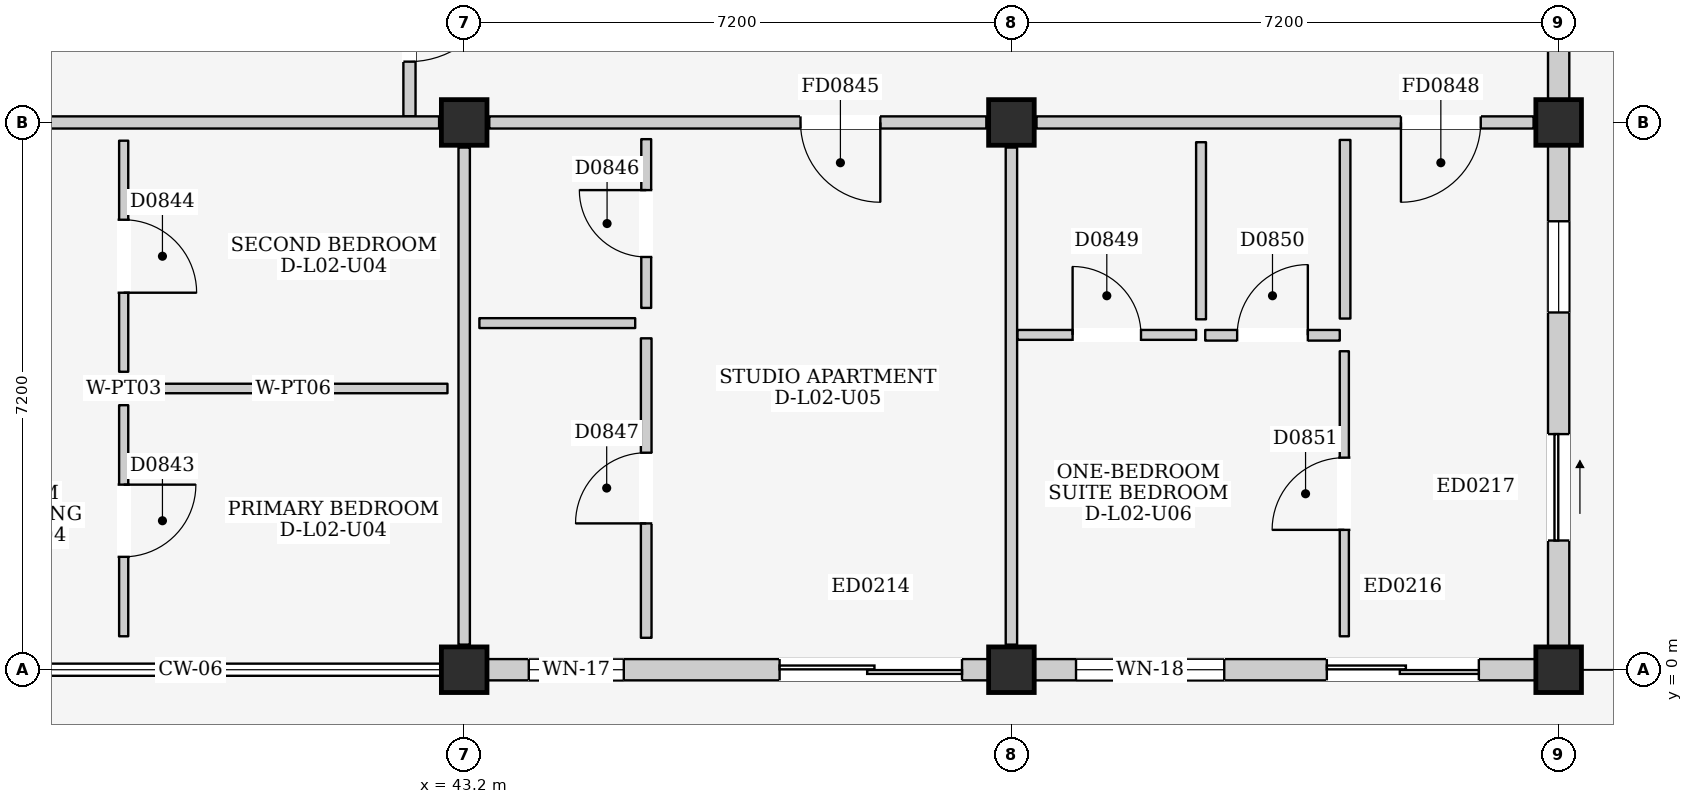
"""IFC4 building model, lengths in metres.
Left out: names, types, materials, properties, quantities, classifications, styles, units other than length and angle.
Written with IfcOpenShell. Run it as: python <this file> out.ifc"""

import sys

from ifc_helpers import new_model, si_unit, direction, frame, frame_2d, origin, origin_2d, place, context, subcontext, project, spatial, rectangle, extrude, element, fill, save


model = new_model("IFC4")
c1 = context("Model", 3, precision=1e-05, world=origin(), true_north=direction((0.0, 1.0)))
c2 = subcontext(c1, "Body", "Model", "MODEL_VIEW")
j1 = project(units=[si_unit("LENGTHUNIT", "METRE"), si_unit("PLANEANGLEUNIT", "RADIAN")], contexts=[c1])
p1 = place(None, origin())
s1 = spatial("IfcSite", under=j1, at=p1, CompositionType="ELEMENT")
p2 = place(p1, origin())
s2 = spatial("IfcBuilding", under=s1, at=p2, CompositionType="ELEMENT")
p3 = place(p2, frame((0.0, 0.0, 9.0)))
s3 = spatial("IfcBuildingStorey", under=s2, at=p3, CompositionType="ELEMENT", Elevation=9.0)
for number, where, z_axis, x_axis in (
    (1, (43.2, 0.0, 0.0), (0.0, 0.0, 1.0), (1.0, 0.0, 0.0)),
    (2, (43.2, 7.2, 0.0), (0.0, 0.0, 1.0), (1.0, 0.0, 0.0)),
    (3, (50.4, 0.0, 0.0), (0.0, 0.0, 1.0), (1.0, 0.0, 0.0)),
    (4, (50.4, 7.2, 0.0), (0.0, 0.0, 1.0), (1.0, 0.0, 0.0)),
    (5, (57.6, 0.0, 0.0), (0.0, 0.0, 1.0), (1.0, 0.0, 0.0)),
    (6, (57.6, 7.2, 0.0), (0.0, 0.0, 1.0), (1.0, 0.0, 0.0)),
):
    element("IfcColumn", number, at=place(p3, frame(where, z_axis=z_axis, x_axis=x_axis)), inside=s3, PredefinedType="COLUMN", context=c2, shape_type="SweptSolid", body=[
        extrude(rectangle(XDim=0.6, YDim=0.6, at=origin_2d()), origin(), (0.0, 0.0, 1.0), 3.2),
    ])
p4 = place(p3, frame((43.5, 0.0, 0.0), z_axis=(0.0, 0.0, 1.0), x_axis=(1.0, 0.0, 0.0)))
e7 = element("IfcWall", 7, at=p4, inside=s3, PredefinedType="ELEMENTEDWALL", context=c2, shape_type="SweptSolid", body=[
    extrude(rectangle(XDim=6.6, YDim=0.28, at=frame_2d((3.3, 0.0))), origin(), (0.0, 0.0, 1.0), 2.425),
])
p5 = place(p4, frame((3.85, 0.0, 0.0)))
e8 = element("IfcOpeningElement", 8, at=p5, cuts=e7, PredefinedType="OPENING", context=c2, shape_type="SweptSolid", body=[
    extrude(rectangle(XDim=2.4, YDim=2.12, at=frame_2d((1.2, 1.06))), frame((0.0, 0.155, 0.0), z_axis=(0.0, -1.0, 0.0), x_axis=(1.0, 0.0, 0.0)), (0.0, 0.0, 1.0), 0.31),
])
p6 = place(p4, frame((0.55, 0.0, 0.9)))
e9 = element("IfcOpeningElement", 9, at=p6, cuts=e7, PredefinedType="OPENING", context=c2, shape_type="SweptSolid", body=[
    extrude(rectangle(XDim=1.25, YDim=1.3, at=frame_2d((0.625, 0.65))), frame((0.0, 0.155, 0.0), z_axis=(0.0, -1.0, 0.0), x_axis=(1.0, 0.0, 0.0)), (0.0, 0.0, 1.0), 0.31),
])
p7 = place(p3, frame((50.7, 0.0, 0.0), z_axis=(0.0, 0.0, 1.0), x_axis=(1.0, 0.0, 0.0)))
e10 = element("IfcWall", 10, at=p7, inside=s3, PredefinedType="ELEMENTEDWALL", context=c2, shape_type="SweptSolid", body=[
    extrude(rectangle(XDim=6.6, YDim=0.28, at=frame_2d((3.3, 0.0))), origin(), (0.0, 0.0, 1.0), 2.425),
])
p8 = place(p7, frame((3.85, 0.0, 0.0)))
e11 = element("IfcOpeningElement", 11, at=p8, cuts=e10, PredefinedType="OPENING", context=c2, shape_type="SweptSolid", body=[
    extrude(rectangle(XDim=2.0, YDim=2.12, at=frame_2d((1.0, 1.06))), frame((0.0, 0.155, 0.0), z_axis=(0.0, -1.0, 0.0), x_axis=(1.0, 0.0, 0.0)), (0.0, 0.0, 1.0), 0.31),
])
p9 = place(p7, frame((0.55, 0.0, 0.765)))
e12 = element("IfcOpeningElement", 12, at=p9, cuts=e10, PredefinedType="OPENING", context=c2, shape_type="SweptSolid", body=[
    extrude(rectangle(XDim=1.95, YDim=1.55, at=frame_2d((0.975, 0.775))), frame((0.0, 0.155, 0.0), z_axis=(0.0, -1.0, 0.0), x_axis=(1.0, 0.0, 0.0)), (0.0, 0.0, 1.0), 0.31),
])
p10 = place(p3, frame((57.6, 0.3, 0.0), z_axis=(0.0, 0.0, 1.0), x_axis=(0.0, 1.0, 0.0)))
e13 = element("IfcWall", 13, at=p10, inside=s3, PredefinedType="ELEMENTEDWALL", context=c2, shape_type="SweptSolid", body=[
    extrude(rectangle(XDim=6.6, YDim=0.28, at=frame_2d((3.3, 0.0))), origin(), (0.0, 0.0, 1.0), 2.395),
])
p11 = place(p10, frame((1.4, 0.0, 0.0)))
e14 = element("IfcOpeningElement", 14, at=p11, cuts=e13, PredefinedType="OPENING", context=c2, shape_type="SweptSolid", body=[
    extrude(rectangle(XDim=1.4, YDim=2.1, at=frame_2d((0.7, 1.05))), frame((0.0, 0.155, 0.0), z_axis=(0.0, -1.0, 0.0), x_axis=(1.0, 0.0, 0.0)), (0.0, 0.0, 1.0), 0.31),
])
p12 = place(p10, frame((4.4, 0.0, 0.935)))
e15 = element("IfcOpeningElement", 15, at=p12, cuts=e13, PredefinedType="OPENING", context=c2, shape_type="SweptSolid", body=[
    extrude(rectangle(XDim=1.2, YDim=1.35, at=frame_2d((0.6, 0.675))), frame((0.0, 0.155, 0.0), z_axis=(0.0, -1.0, 0.0), x_axis=(1.0, 0.0, 0.0)), (0.0, 0.0, 1.0), 0.31),
])
p13 = place(p3, frame((57.6, 7.5, 0.0), z_axis=(0.0, 0.0, 1.0), x_axis=(0.0, 1.0, 0.0)))
e16 = element("IfcWall", 16, at=p13, inside=s3, PredefinedType="ELEMENTEDWALL", context=c2, shape_type="SweptSolid", body=[
    extrude(rectangle(XDim=6.6, YDim=0.28, at=frame_2d((3.3, 0.0))), origin(), (0.0, 0.0, 1.0), 2.395),
])
p14 = place(p13, frame((2.8, 0.0, 1.1)))
e17 = element("IfcOpeningElement", 17, at=p14, cuts=e16, PredefinedType="OPENING", context=c2, shape_type="SweptSolid", body=[
    extrude(rectangle(XDim=1.0, YDim=0.9, at=frame_2d((0.5, 0.45))), frame((0.0, 0.155, 0.0), z_axis=(0.0, -1.0, 0.0), x_axis=(1.0, 0.0, 0.0)), (0.0, 0.0, 1.0), 0.31),
])
p15 = place(p3, frame((42.48, 7.28, 0.0), z_axis=(0.0, 0.0, 1.0), x_axis=(0.0, 1.0, 0.0)))
e18 = element("IfcWall", 18, at=p15, inside=s3, PredefinedType="PARTITIONING", context=c2, shape_type="SweptSolid", body=[
    extrude(rectangle(XDim=4.32, YDim=0.16, at=frame_2d((2.16, 0.0))), origin(), (0.0, 0.0, 1.0), 2.96),
])
p16 = place(p15, frame((0.72, 0.0, 0.0)))
e19 = element("IfcOpeningElement", 19, at=p16, cuts=e18, PredefinedType="OPENING", context=c2, shape_type="SweptSolid", body=[
    extrude(rectangle(XDim=1.2, YDim=2.2, at=frame_2d((0.6, 1.1))), frame((0.0, 0.095, 0.0), z_axis=(0.0, -1.0, 0.0), x_axis=(1.0, 0.0, 0.0)), (0.0, 0.0, 1.0), 0.19),
])
p17 = place(p3, frame((36.33, 7.2, 0.0), z_axis=(0.0, 0.0, 1.0), x_axis=(1.0, 0.0, 0.0)))
e20 = element("IfcWall", 20, at=p17, inside=s3, PredefinedType="PARTITIONING", context=c2, shape_type="SweptSolid", body=[
    extrude(rectangle(XDim=6.54, YDim=0.16, at=frame_2d((3.27, 0.0))), origin(), (0.0, 0.0, 1.0), 2.345),
])
p18 = place(p3, frame((43.2, 0.33, 0.0), z_axis=(0.0, 0.0, 1.0), x_axis=(0.0, 1.0, 0.0)))
e21 = element("IfcWall", 21, at=p18, inside=s3, PredefinedType="PARTITIONING", context=c2, shape_type="SweptSolid", body=[
    extrude(rectangle(XDim=6.54, YDim=0.15, at=frame_2d((3.27, 0.0))), origin(), (0.0, 0.0, 1.0), 2.395),
])
p19 = place(p3, frame((38.72, 0.44, 0.0), z_axis=(0.0, 0.0, 1.0), x_axis=(0.0, 1.0, 0.0)))
e22 = element("IfcWall", 22, at=p19, inside=s3, PredefinedType="PARTITIONING", context=c2, shape_type="SweptSolid", body=[
    extrude(rectangle(XDim=3.04, YDim=0.12, at=frame_2d((1.52, 0.0))), origin(), (0.0, 0.0, 1.0), 2.96),
])
p20 = place(p19, frame((1.045, 0.0, 0.0)))
e23 = element("IfcOpeningElement", 23, at=p20, cuts=e22, PredefinedType="OPENING", context=c2, shape_type="SweptSolid", body=[
    extrude(rectangle(XDim=0.95, YDim=2.15, at=frame_2d((0.475, 1.075))), frame((0.0, 0.075, 0.0), z_axis=(0.0, -1.0, 0.0), x_axis=(1.0, 0.0, 0.0)), (0.0, 0.0, 1.0), 0.15),
])
p21 = place(p3, frame((38.92, 3.7, 0.0), z_axis=(0.0, 0.0, 1.0), x_axis=(1.0, 0.0, 0.0)))
e24 = element("IfcWall", 24, at=p21, inside=s3, PredefinedType="PARTITIONING", context=c2, shape_type="SweptSolid", body=[
    extrude(rectangle(XDim=4.06, YDim=0.125, at=frame_2d((2.03, 0.0))), origin(), (0.0, 0.0, 1.0), 2.96),
])
p22 = place(p3, frame((38.72, 3.92, 0.0), z_axis=(0.0, 0.0, 1.0), x_axis=(0.0, 1.0, 0.0)))
e25 = element("IfcWall", 25, at=p22, inside=s3, PredefinedType="PARTITIONING", context=c2, shape_type="SweptSolid", body=[
    extrude(rectangle(XDim=3.04, YDim=0.12, at=frame_2d((1.52, 0.0))), origin(), (0.0, 0.0, 1.0), 2.96),
])
p23 = place(p22, frame((1.04, 0.0, 0.0)))
e26 = element("IfcOpeningElement", 26, at=p23, cuts=e25, PredefinedType="OPENING", context=c2, shape_type="SweptSolid", body=[
    extrude(rectangle(XDim=0.96, YDim=2.15, at=frame_2d((0.48, 1.075))), frame((0.0, 0.075, 0.0), z_axis=(0.0, -1.0, 0.0), x_axis=(1.0, 0.0, 0.0)), (0.0, 0.0, 1.0), 0.15),
])
p24 = place(p3, frame((43.53, 7.2, 0.0), z_axis=(0.0, 0.0, 1.0), x_axis=(1.0, 0.0, 0.0)))
e27 = element("IfcWall", 27, at=p24, inside=s3, PredefinedType="PARTITIONING", context=c2, shape_type="SweptSolid", body=[
    extrude(rectangle(XDim=6.54, YDim=0.16, at=frame_2d((3.27, 0.0))), origin(), (0.0, 0.0, 1.0), 2.345),
])
p25 = place(p24, frame((4.095, 0.0, 0.0)))
e28 = element("IfcOpeningElement", 28, at=p25, cuts=e27, PredefinedType="OPENING", context=c2, shape_type="SweptSolid", body=[
    extrude(rectangle(XDim=1.05, YDim=2.15, at=frame_2d((0.525, 1.075))), frame((0.0, 0.095, 0.0), z_axis=(0.0, -1.0, 0.0), x_axis=(1.0, 0.0, 0.0)), (0.0, 0.0, 1.0), 0.19),
])
p26 = place(p3, frame((50.4, 0.33, 0.0), z_axis=(0.0, 0.0, 1.0), x_axis=(0.0, 1.0, 0.0)))
e29 = element("IfcWall", 29, at=p26, inside=s3, PredefinedType="PARTITIONING", context=c2, shape_type="SweptSolid", body=[
    extrude(rectangle(XDim=6.54, YDim=0.15, at=frame_2d((3.27, 0.0))), origin(), (0.0, 0.0, 1.0), 2.395),
])
p27 = place(p3, frame((43.4, 4.56, 0.0), z_axis=(0.0, 0.0, 1.0), x_axis=(1.0, 0.0, 0.0)))
e30 = element("IfcWall", 30, at=p27, inside=s3, PredefinedType="PARTITIONING", context=c2, shape_type="SweptSolid", body=[
    extrude(rectangle(XDim=2.05, YDim=0.13, at=frame_2d((1.025, 0.0))), origin(), (0.0, 0.0, 1.0), 2.96),
])
p28 = place(p3, frame((45.595, 4.76, 0.0), z_axis=(0.0, 0.0, 1.0), x_axis=(0.0, 1.0, 0.0)))
e31 = element("IfcWall", 31, at=p28, inside=s3, PredefinedType="PARTITIONING", context=c2, shape_type="SweptSolid", body=[
    extrude(rectangle(XDim=2.22, YDim=0.13, at=frame_2d((1.11, 0.0))), origin(), (0.0, 0.0, 1.0), 2.96),
])
p29 = place(p28, frame((0.67, 0.0, 0.0)))
e32 = element("IfcOpeningElement", 32, at=p29, cuts=e31, PredefinedType="OPENING", context=c2, shape_type="SweptSolid", body=[
    extrude(rectangle(XDim=0.88, YDim=2.1, at=frame_2d((0.44, 1.05))), frame((0.0, 0.08, 0.0), z_axis=(0.0, -1.0, 0.0), x_axis=(1.0, 0.0, 0.0)), (0.0, 0.0, 1.0), 0.16),
])
p30 = place(p3, frame((45.595, 0.42, 0.0), z_axis=(0.0, 0.0, 1.0), x_axis=(0.0, 1.0, 0.0)))
e33 = element("IfcWall", 33, at=p30, inside=s3, PredefinedType="PARTITIONING", context=c2, shape_type="SweptSolid", body=[
    extrude(rectangle(XDim=3.94, YDim=0.14, at=frame_2d((1.97, 0.0))), origin(), (0.0, 0.0, 1.0), 2.96),
])
p31 = place(p30, frame((1.505, 0.0, 0.0)))
e34 = element("IfcOpeningElement", 34, at=p31, cuts=e33, PredefinedType="OPENING", context=c2, shape_type="SweptSolid", body=[
    extrude(rectangle(XDim=0.93, YDim=2.14, at=frame_2d((0.465, 1.07))), frame((0.0, 0.085, 0.0), z_axis=(0.0, -1.0, 0.0), x_axis=(1.0, 0.0, 0.0)), (0.0, 0.0, 1.0), 0.17),
])
p32 = place(p3, frame((50.73, 7.2, 0.0), z_axis=(0.0, 0.0, 1.0), x_axis=(1.0, 0.0, 0.0)))
e35 = element("IfcWall", 35, at=p32, inside=s3, PredefinedType="PARTITIONING", context=c2, shape_type="SweptSolid", body=[
    extrude(rectangle(XDim=6.54, YDim=0.16, at=frame_2d((3.27, 0.0))), origin(), (0.0, 0.0, 1.0), 2.345),
])
p33 = place(p32, frame((4.795, 0.0, 0.0)))
e36 = element("IfcOpeningElement", 36, at=p33, cuts=e35, PredefinedType="OPENING", context=c2, shape_type="SweptSolid", body=[
    extrude(rectangle(XDim=1.05, YDim=2.15, at=frame_2d((0.525, 1.075))), frame((0.0, 0.095, 0.0), z_axis=(0.0, -1.0, 0.0), x_axis=(1.0, 0.0, 0.0)), (0.0, 0.0, 1.0), 0.19),
])
p34 = place(p3, frame((50.48, 4.405, 0.0), z_axis=(0.0, 0.0, 1.0), x_axis=(1.0, 0.0, 0.0)))
e37 = element("IfcWall", 37, at=p34, inside=s3, PredefinedType="PARTITIONING", context=c2, shape_type="SweptSolid", body=[
    extrude(rectangle(XDim=2.35, YDim=0.13, at=frame_2d((1.175, 0.0))), origin(), (0.0, 0.0, 1.0), 2.96),
])
p35 = place(p34, frame((0.725, 0.0, 0.0)))
e38 = element("IfcOpeningElement", 38, at=p35, cuts=e37, PredefinedType="OPENING", context=c2, shape_type="SweptSolid", body=[
    extrude(rectangle(XDim=0.9, YDim=2.1, at=frame_2d((0.45, 1.05))), frame((0.0, 0.08, 0.0), z_axis=(0.0, -1.0, 0.0), x_axis=(1.0, 0.0, 0.0)), (0.0, 0.0, 1.0), 0.16),
])
p36 = place(p3, frame((52.895, 4.61, 0.0), z_axis=(0.0, 0.0, 1.0), x_axis=(0.0, 1.0, 0.0)))
e39 = element("IfcWall", 39, at=p36, inside=s3, PredefinedType="PARTITIONING", context=c2, shape_type="SweptSolid", body=[
    extrude(rectangle(XDim=2.33, YDim=0.13, at=frame_2d((1.165, 0.0))), origin(), (0.0, 0.0, 1.0), 2.96),
])
p37 = place(p3, frame((52.95, 4.4, 0.0), z_axis=(0.0, 0.0, 1.0), x_axis=(1.0, 0.0, 0.0)))
e40 = element("IfcWall", 40, at=p37, inside=s3, PredefinedType="PARTITIONING", context=c2, shape_type="SweptSolid", body=[
    extrude(rectangle(XDim=1.77, YDim=0.14, at=frame_2d((0.885, 0.0))), origin(), (0.0, 0.0, 1.0), 2.96),
])
p38 = place(p37, frame((0.42, 0.0, 0.0)))
e41 = element("IfcOpeningElement", 41, at=p38, cuts=e40, PredefinedType="OPENING", context=c2, shape_type="SweptSolid", body=[
    extrude(rectangle(XDim=0.93, YDim=2.14, at=frame_2d((0.465, 1.07))), frame((0.0, 0.085, 0.0), z_axis=(0.0, -1.0, 0.0), x_axis=(1.0, 0.0, 0.0)), (0.0, 0.0, 1.0), 0.17),
])
p39 = place(p3, frame((54.79, 4.62, 0.0), z_axis=(0.0, 0.0, 1.0), x_axis=(0.0, 1.0, 0.0)))
e42 = element("IfcWall", 42, at=p39, inside=s3, PredefinedType="PARTITIONING", context=c2, shape_type="SweptSolid", body=[
    extrude(rectangle(XDim=2.35, YDim=0.14, at=frame_2d((1.175, 0.0))), origin(), (0.0, 0.0, 1.0), 2.96),
])
p40 = place(p3, frame((54.78, 0.44, 0.0), z_axis=(0.0, 0.0, 1.0), x_axis=(0.0, 1.0, 0.0)))
e43 = element("IfcWall", 43, at=p40, inside=s3, PredefinedType="PARTITIONING", context=c2, shape_type="SweptSolid", body=[
    extrude(rectangle(XDim=3.75, YDim=0.12, at=frame_2d((1.875, 0.0))), origin(), (0.0, 0.0, 1.0), 2.96),
])
p41 = place(p40, frame((1.4, 0.0, 0.0)))
e44 = element("IfcOpeningElement", 44, at=p41, cuts=e43, PredefinedType="OPENING", context=c2, shape_type="SweptSolid", body=[
    extrude(rectangle(XDim=0.95, YDim=2.15, at=frame_2d((0.475, 1.075))), frame((0.0, 0.075, 0.0), z_axis=(0.0, -1.0, 0.0), x_axis=(1.0, 0.0, 0.0)), (0.0, 0.0, 1.0), 0.15),
])
p42 = place(p5, frame((2.4, 0.0, 0.0), z_axis=(0.0, 0.0, 1.0), x_axis=(-1.0, 0.0, 0.0)))
e45 = element("IfcDoor", 45, at=p42, inside=s3, OperationType="DOUBLE_DOOR_SLIDING", PredefinedType="DOOR", context=c2, shape_type="SweptSolid", body=[
    extrude(rectangle(XDim=2.4, YDim=2.12, at=frame_2d((1.2, 1.06))), frame((0.0, 0.025, 0.0), z_axis=(0.0, -1.0, 0.0), x_axis=(1.0, 0.0, 0.0)), (0.0, 0.0, 1.0), 0.05),
])
fill(e8, e45)
p43 = place(p6, origin())
e46 = element("IfcWindow", 46, at=p43, inside=s3, PartitioningType="SINGLE_PANEL", PredefinedType="WINDOW", context=c2, shape_type="SweptSolid", body=[
    extrude(rectangle(XDim=1.25, YDim=1.3, at=frame_2d((0.625, 0.65))), frame((0.0, 0.03, 0.0), z_axis=(0.0, -1.0, 0.0), x_axis=(1.0, 0.0, 0.0)), (0.0, 0.0, 1.0), 0.06),
])
fill(e9, e46)
p44 = place(p8, frame((2.0, 0.0, 0.0), z_axis=(0.0, 0.0, 1.0), x_axis=(-1.0, 0.0, 0.0)))
e47 = element("IfcDoor", 47, at=p44, inside=s3, OperationType="DOUBLE_DOOR_SLIDING", PredefinedType="DOOR", context=c2, shape_type="SweptSolid", body=[
    extrude(rectangle(XDim=2.0, YDim=2.12, at=frame_2d((1.0, 1.06))), frame((0.0, 0.025, 0.0), z_axis=(0.0, -1.0, 0.0), x_axis=(1.0, 0.0, 0.0)), (0.0, 0.0, 1.0), 0.05),
])
fill(e11, e47)
p45 = place(p9, origin())
e48 = element("IfcWindow", 48, at=p45, inside=s3, PartitioningType="DOUBLE_PANEL_VERTICAL", PredefinedType="WINDOW", context=c2, shape_type="SweptSolid", body=[
    extrude(rectangle(XDim=1.95, YDim=1.55, at=frame_2d((0.975, 0.775))), frame((0.0, 0.03, 0.0), z_axis=(0.0, -1.0, 0.0), x_axis=(1.0, 0.0, 0.0)), (0.0, 0.0, 1.0), 0.06),
])
fill(e12, e48)
p46 = place(p11, frame((1.4, 0.0, 0.0), z_axis=(0.0, 0.0, 1.0), x_axis=(-1.0, 0.0, 0.0)))
e49 = element("IfcDoor", 49, at=p46, inside=s3, OperationType="SLIDING_TO_RIGHT", PredefinedType="DOOR", context=c2, shape_type="SweptSolid", body=[
    extrude(rectangle(XDim=1.4, YDim=2.1, at=frame_2d((0.7, 1.05))), frame((0.0, 0.025, 0.0), z_axis=(0.0, -1.0, 0.0), x_axis=(1.0, 0.0, 0.0)), (0.0, 0.0, 1.0), 0.05),
])
fill(e14, e49)
p47 = place(p12, origin())
e50 = element("IfcWindow", 50, at=p47, inside=s3, PartitioningType="SINGLE_PANEL", PredefinedType="WINDOW", context=c2, shape_type="SweptSolid", body=[
    extrude(rectangle(XDim=1.2, YDim=1.35, at=frame_2d((0.6, 0.675))), frame((0.0, 0.03, 0.0), z_axis=(0.0, -1.0, 0.0), x_axis=(1.0, 0.0, 0.0)), (0.0, 0.0, 1.0), 0.06),
])
fill(e15, e50)
p48 = place(p16, frame((1.2, 0.0, 0.0), z_axis=(0.0, 0.0, 1.0), x_axis=(-1.0, 0.0, 0.0)))
e51 = element("IfcDoor", 51, at=p48, inside=s3, OperationType="SINGLE_SWING_LEFT", PredefinedType="DOOR", context=c2, shape_type="SweptSolid", body=[
    extrude(rectangle(XDim=1.2, YDim=2.2, at=frame_2d((0.6, 1.1))), frame((0.0, 0.025, 0.0), z_axis=(0.0, -1.0, 0.0), x_axis=(1.0, 0.0, 0.0)), (0.0, 0.0, 1.0), 0.05),
])
fill(e19, e51)
p49 = place(p20, frame((0.95, 0.0, 0.0), z_axis=(0.0, 0.0, 1.0), x_axis=(-1.0, 0.0, 0.0)))
e52 = element("IfcDoor", 52, at=p49, inside=s3, OperationType="SINGLE_SWING_LEFT", PredefinedType="DOOR", context=c2, shape_type="SweptSolid", body=[
    extrude(rectangle(XDim=0.95, YDim=2.15, at=frame_2d((0.475, 1.075))), frame((0.0, 0.025, 0.0), z_axis=(0.0, -1.0, 0.0), x_axis=(1.0, 0.0, 0.0)), (0.0, 0.0, 1.0), 0.05),
])
fill(e23, e52)
p50 = place(p23, frame((0.96, 0.0, 0.0), z_axis=(0.0, 0.0, 1.0), x_axis=(-1.0, 0.0, 0.0)))
e53 = element("IfcDoor", 53, at=p50, inside=s3, OperationType="SINGLE_SWING_RIGHT", PredefinedType="DOOR", context=c2, shape_type="SweptSolid", body=[
    extrude(rectangle(XDim=0.96, YDim=2.15, at=frame_2d((0.48, 1.075))), frame((0.0, 0.025, 0.0), z_axis=(0.0, -1.0, 0.0), x_axis=(1.0, 0.0, 0.0)), (0.0, 0.0, 1.0), 0.05),
])
fill(e26, e53)
p51 = place(p25, frame((1.05, 0.0, 0.0), z_axis=(0.0, 0.0, 1.0), x_axis=(-1.0, 0.0, 0.0)))
e54 = element("IfcDoor", 54, at=p51, inside=s3, OperationType="SINGLE_SWING_LEFT", PredefinedType="DOOR", context=c2, shape_type="SweptSolid", body=[
    extrude(rectangle(XDim=1.05, YDim=2.15, at=frame_2d((0.525, 1.075))), frame((0.0, 0.025, 0.0), z_axis=(0.0, -1.0, 0.0), x_axis=(1.0, 0.0, 0.0)), (0.0, 0.0, 1.0), 0.05),
])
fill(e28, e54)
p52 = place(p29, origin())
e55 = element("IfcDoor", 55, at=p52, inside=s3, OperationType="SINGLE_SWING_RIGHT", PredefinedType="DOOR", context=c2, shape_type="SweptSolid", body=[
    extrude(rectangle(XDim=0.88, YDim=2.1, at=frame_2d((0.44, 1.05))), frame((0.0, 0.025, 0.0), z_axis=(0.0, -1.0, 0.0), x_axis=(1.0, 0.0, 0.0)), (0.0, 0.0, 1.0), 0.05),
])
fill(e32, e55)
p53 = place(p31, origin())
e56 = element("IfcDoor", 56, at=p53, inside=s3, OperationType="SINGLE_SWING_LEFT", PredefinedType="DOOR", context=c2, shape_type="SweptSolid", body=[
    extrude(rectangle(XDim=0.93, YDim=2.14, at=frame_2d((0.465, 1.07))), frame((0.0, 0.025, 0.0), z_axis=(0.0, -1.0, 0.0), x_axis=(1.0, 0.0, 0.0)), (0.0, 0.0, 1.0), 0.05),
])
fill(e34, e56)
p54 = place(p33, frame((1.05, 0.0, 0.0), z_axis=(0.0, 0.0, 1.0), x_axis=(-1.0, 0.0, 0.0)))
e57 = element("IfcDoor", 57, at=p54, inside=s3, OperationType="SINGLE_SWING_RIGHT", PredefinedType="DOOR", context=c2, shape_type="SweptSolid", body=[
    extrude(rectangle(XDim=1.05, YDim=2.15, at=frame_2d((0.525, 1.075))), frame((0.0, 0.025, 0.0), z_axis=(0.0, -1.0, 0.0), x_axis=(1.0, 0.0, 0.0)), (0.0, 0.0, 1.0), 0.05),
])
fill(e36, e57)
p55 = place(p35, origin())
e58 = element("IfcDoor", 58, at=p55, inside=s3, OperationType="SINGLE_SWING_LEFT", PredefinedType="DOOR", context=c2, shape_type="SweptSolid", body=[
    extrude(rectangle(XDim=0.9, YDim=2.1, at=frame_2d((0.45, 1.05))), frame((0.0, 0.025, 0.0), z_axis=(0.0, -1.0, 0.0), x_axis=(1.0, 0.0, 0.0)), (0.0, 0.0, 1.0), 0.05),
])
fill(e38, e58)
p56 = place(p38, origin())
e59 = element("IfcDoor", 59, at=p56, inside=s3, OperationType="SINGLE_SWING_RIGHT", PredefinedType="DOOR", context=c2, shape_type="SweptSolid", body=[
    extrude(rectangle(XDim=0.93, YDim=2.14, at=frame_2d((0.465, 1.07))), frame((0.0, 0.025, 0.0), z_axis=(0.0, -1.0, 0.0), x_axis=(1.0, 0.0, 0.0)), (0.0, 0.0, 1.0), 0.05),
])
fill(e41, e59)
p57 = place(p41, origin())
e60 = element("IfcDoor", 60, at=p57, inside=s3, OperationType="SINGLE_SWING_LEFT", PredefinedType="DOOR", context=c2, shape_type="SweptSolid", body=[
    extrude(rectangle(XDim=0.95, YDim=2.15, at=frame_2d((0.475, 1.075))), frame((0.0, 0.025, 0.0), z_axis=(0.0, -1.0, 0.0), x_axis=(1.0, 0.0, 0.0)), (0.0, 0.0, 1.0), 0.05),
])
fill(e44, e60)
save(model, sys.argv[1])
